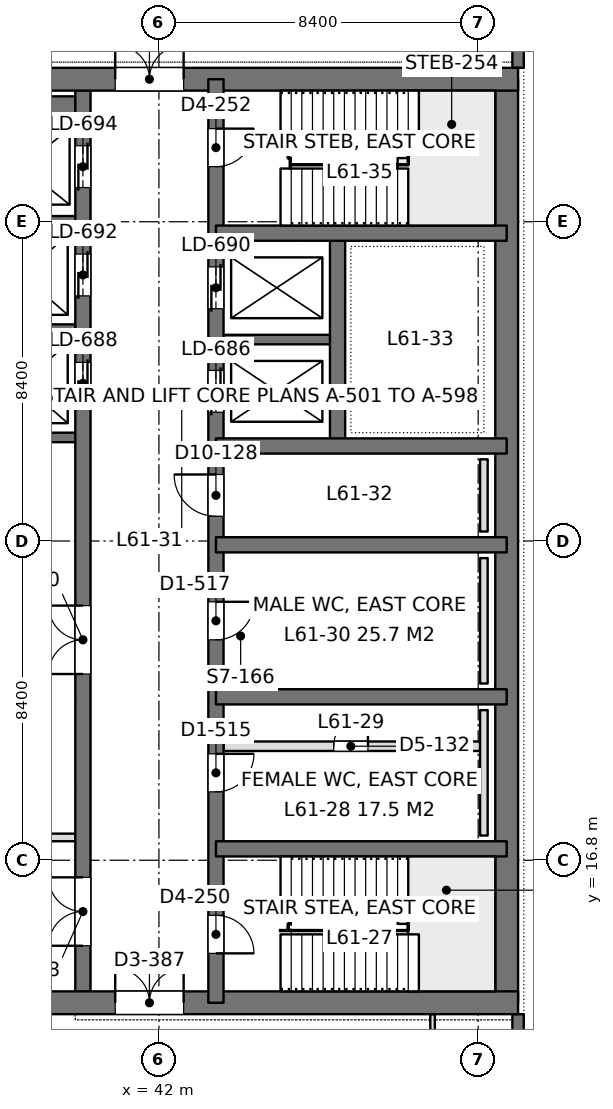
"""IFC4 building model, lengths in metres.
Left out: names, types, materials, properties, quantities, classifications, styles, units other than length and angle.
Written with IfcOpenShell. Run it as: python <this file> out.ifc"""

import sys

from ifc_helpers import new_model, si_unit, direction, frame, frame_2d, origin, place, context, subcontext, project, spatial, rectangle, extrude, element, fill, save


model = new_model("IFC4")
c1 = context("Model", 3, precision=1e-05, world=origin(), true_north=direction((0.0, 1.0)))
c2 = subcontext(c1, "Body", "Model", "MODEL_VIEW")
j1 = project(units=[si_unit("LENGTHUNIT", "METRE"), si_unit("PLANEANGLEUNIT", "RADIAN")], contexts=[c1])
p1 = place(None, origin())
s1 = spatial("IfcSite", under=j1, at=p1, CompositionType="ELEMENT")
p2 = place(p1, origin())
s2 = spatial("IfcBuilding", under=s1, at=p2, CompositionType="ELEMENT")
p3 = place(p2, frame((0.0, 0.0, 268.2)))
s3 = spatial("IfcBuildingStorey", under=s2, at=p3, CompositionType="ELEMENT", Elevation=268.2)
p4 = place(p3, frame((33.75, 13.05, 0.0), z_axis=(0.0, 0.0, 1.0), x_axis=(1.0, 0.0, 0.0)))
e1 = element("IfcWall", 1, at=p4, inside=s3, PredefinedType="SHEAR", context=c2, shape_type="SweptSolid", body=[
    extrude(rectangle(XDim=17.7, YDim=0.6, at=frame_2d((8.85, 0.0))), origin(), (0.0, 0.0, 1.0), 4.5),
])
p5 = place(p4, frame((7.1, 0.0, 0.0)))
e2 = element("IfcOpeningElement", 2, at=p5, cuts=e1, PredefinedType="OPENING", context=c2, shape_type="SweptSolid", body=[
    extrude(rectangle(XDim=1.8, YDim=2.4, at=frame_2d((0.9, 1.2))), frame((0.0, 0.31, 0.0), z_axis=(0.0, -1.0, 0.0), x_axis=(1.0, 0.0, 0.0)), (0.0, 0.0, 1.0), 0.62),
])
p6 = place(p3, frame((33.75, 37.35, 0.0), z_axis=(0.0, 0.0, 1.0), x_axis=(1.0, 0.0, 0.0)))
e3 = element("IfcWall", 3, at=p6, inside=s3, PredefinedType="SHEAR", context=c2, shape_type="SweptSolid", body=[
    extrude(rectangle(XDim=17.7, YDim=0.6, at=frame_2d((8.85, 0.0))), origin(), (0.0, 0.0, 1.0), 4.5),
])
p7 = place(p6, frame((7.1, 0.0, 0.0)))
e4 = element("IfcOpeningElement", 4, at=p7, cuts=e3, PredefinedType="OPENING", context=c2, shape_type="SweptSolid", body=[
    extrude(rectangle(XDim=1.8, YDim=2.4, at=frame_2d((0.9, 1.2))), frame((0.0, 0.31, 0.0), z_axis=(0.0, -1.0, 0.0), x_axis=(1.0, 0.0, 0.0)), (0.0, 0.0, 1.0), 0.62),
])
p8 = place(p3, frame((51.15, 13.05, 0.0), z_axis=(0.0, 0.0, 1.0), x_axis=(0.0, 1.0, 0.0)))
e5 = element("IfcWall", 5, at=p8, inside=s3, PredefinedType="SHEAR", context=c2, shape_type="SweptSolid", body=[
    extrude(rectangle(XDim=24.3, YDim=0.6, at=frame_2d((12.15, 0.0))), origin(), (0.0, 0.0, 1.0), 4.5),
])
p9 = place(p3, frame((43.5, 13.05, 0.0), z_axis=(0.0, 0.0, 1.0), x_axis=(0.0, 1.0, 0.0)))
e6 = element("IfcWall", 6, at=p9, inside=s3, PredefinedType="SHEAR", context=c2, shape_type="SweptSolid", body=[
    extrude(rectangle(XDim=24.3, YDim=0.4, at=frame_2d((12.15, 0.0))), origin(), (0.0, 0.0, 1.0), 4.5),
])
p10 = place(p9, frame((1.3, 0.0, 0.0)))
e7 = element("IfcOpeningElement", 7, at=p10, cuts=e6, PredefinedType="OPENING", context=c2, shape_type="SweptSolid", body=[
    extrude(rectangle(XDim=1.0, YDim=2.2, at=frame_2d((0.5, 1.1))), frame((0.0, 0.21, 0.0), z_axis=(0.0, -1.0, 0.0), x_axis=(1.0, 0.0, 0.0)), (0.0, 0.0, 1.0), 0.42),
])
p11 = place(p9, frame((22.0, 0.0, 0.0)))
e8 = element("IfcOpeningElement", 8, at=p11, cuts=e6, PredefinedType="OPENING", context=c2, shape_type="SweptSolid", body=[
    extrude(rectangle(XDim=1.0, YDim=2.2, at=frame_2d((0.5, 1.1))), frame((0.0, 0.21, 0.0), z_axis=(0.0, -1.0, 0.0), x_axis=(1.0, 0.0, 0.0)), (0.0, 0.0, 1.0), 0.42),
])
p12 = place(p9, frame((5.55, 0.0, 0.0)))
e9 = element("IfcOpeningElement", 9, at=p12, cuts=e6, PredefinedType="OPENING", context=c2, shape_type="SweptSolid", body=[
    extrude(rectangle(XDim=1.0, YDim=2.2, at=frame_2d((0.5, 1.1))), frame((0.0, 0.21, 0.0), z_axis=(0.0, -1.0, 0.0), x_axis=(1.0, 0.0, 0.0)), (0.0, 0.0, 1.0), 0.42),
])
p13 = place(p9, frame((9.55, 0.0, 0.0)))
e10 = element("IfcOpeningElement", 10, at=p13, cuts=e6, PredefinedType="OPENING", context=c2, shape_type="SweptSolid", body=[
    extrude(rectangle(XDim=1.0, YDim=2.2, at=frame_2d((0.5, 1.1))), frame((0.0, 0.21, 0.0), z_axis=(0.0, -1.0, 0.0), x_axis=(1.0, 0.0, 0.0)), (0.0, 0.0, 1.0), 0.42),
])
p14 = place(p9, frame((12.8, 0.0, 0.0)))
e11 = element("IfcOpeningElement", 11, at=p14, cuts=e6, PredefinedType="OPENING", context=c2, shape_type="SweptSolid", body=[
    extrude(rectangle(XDim=1.1, YDim=2.2, at=frame_2d((0.55, 1.1))), frame((0.0, 0.21, 0.0), z_axis=(0.0, -1.0, 0.0), x_axis=(1.0, 0.0, 0.0)), (0.0, 0.0, 1.0), 0.42),
])
p15 = place(p9, frame((15.538, 0.0, 0.0)))
e12 = element("IfcOpeningElement", 12, at=p15, cuts=e6, PredefinedType="OPENING", context=c2, shape_type="SweptSolid", body=[
    extrude(rectangle(XDim=1.1, YDim=2.2, at=frame_2d((0.55, 1.1))), frame((0.0, 0.21, 0.0), z_axis=(0.0, -1.0, 0.0), x_axis=(1.0, 0.0, 0.0)), (0.0, 0.0, 1.0), 0.42),
])
p16 = place(p9, frame((18.262, 0.0, 0.0)))
e13 = element("IfcOpeningElement", 13, at=p16, cuts=e6, PredefinedType="OPENING", context=c2, shape_type="SweptSolid", body=[
    extrude(rectangle(XDim=1.1, YDim=2.2, at=frame_2d((0.55, 1.1))), frame((0.0, 0.21, 0.0), z_axis=(0.0, -1.0, 0.0), x_axis=(1.0, 0.0, 0.0)), (0.0, 0.0, 1.0), 0.42),
])
p17 = place(p3, frame((40.0, 13.05, 0.0), z_axis=(0.0, 0.0, 1.0), x_axis=(0.0, 1.0, 0.0)))
e14 = element("IfcWall", 14, at=p17, inside=s3, PredefinedType="SHEAR", context=c2, shape_type="SweptSolid", body=[
    extrude(rectangle(XDim=24.3, YDim=0.4, at=frame_2d((12.15, 0.0))), origin(), (0.0, 0.0, 1.0), 4.5),
])
p18 = place(p17, frame((15.75, 0.0, 0.0)))
e15 = element("IfcOpeningElement", 15, at=p18, cuts=e14, PredefinedType="OPENING", context=c2, shape_type="SweptSolid", body=[
    extrude(rectangle(XDim=1.1, YDim=2.2, at=frame_2d((0.55, 1.1))), frame((0.0, 0.21, 0.0), z_axis=(0.0, -1.0, 0.0), x_axis=(1.0, 0.0, 0.0)), (0.0, 0.0, 1.0), 0.42),
])
p19 = place(p17, frame((18.6, 0.0, 0.0)))
e16 = element("IfcOpeningElement", 16, at=p19, cuts=e14, PredefinedType="OPENING", context=c2, shape_type="SweptSolid", body=[
    extrude(rectangle(XDim=1.1, YDim=2.2, at=frame_2d((0.55, 1.1))), frame((0.0, 0.21, 0.0), z_axis=(0.0, -1.0, 0.0), x_axis=(1.0, 0.0, 0.0)), (0.0, 0.0, 1.0), 0.42),
])
p20 = place(p17, frame((21.45, 0.0, 0.0)))
e17 = element("IfcOpeningElement", 17, at=p20, cuts=e14, PredefinedType="OPENING", context=c2, shape_type="SweptSolid", body=[
    extrude(rectangle(XDim=1.1, YDim=2.2, at=frame_2d((0.55, 1.1))), frame((0.0, 0.21, 0.0), z_axis=(0.0, -1.0, 0.0), x_axis=(1.0, 0.0, 0.0)), (0.0, 0.0, 1.0), 0.42),
])
p21 = place(p17, frame((8.65, 0.0, 0.0)))
e18 = element("IfcOpeningElement", 18, at=p21, cuts=e14, PredefinedType="OPENING", context=c2, shape_type="SweptSolid", body=[
    extrude(rectangle(XDim=1.8, YDim=2.4, at=frame_2d((0.9, 1.2))), frame((0.0, 0.21, 0.0), z_axis=(0.0, -1.0, 0.0), x_axis=(1.0, 0.0, 0.0)), (0.0, 0.0, 1.0), 0.42),
])
p22 = place(p17, frame((1.5, 0.0, 0.0)))
e19 = element("IfcOpeningElement", 19, at=p22, cuts=e14, PredefinedType="OPENING", context=c2, shape_type="SweptSolid", body=[
    extrude(rectangle(XDim=1.8, YDim=2.4, at=frame_2d((0.9, 1.2))), frame((0.0, 0.21, 0.0), z_axis=(0.0, -1.0, 0.0), x_axis=(1.0, 0.0, 0.0)), (0.0, 0.0, 1.0), 0.42),
])
for number, where, z_axis, x_axis in (
    (20, (51.15, 17.1, 0.0), (0.0, 0.0, 1.0), (-1.0, 0.0, 0.0)),
    (21, (51.15, 21.1, 0.0), (0.0, 0.0, 1.0), (-1.0, 0.0, 0.0)),
    (22, (51.15, 25.1, 0.0), (0.0, 0.0, 1.0), (-1.0, 0.0, 0.0)),
    (23, (51.15, 27.7, 0.0), (0.0, 0.0, 1.0), (-1.0, 0.0, 0.0)),
    (24, (51.15, 33.3, 0.0), (0.0, 0.0, 1.0), (-1.0, 0.0, 0.0)),
):
    element("IfcWall", number, at=place(p3, frame(where, z_axis=z_axis, x_axis=x_axis)), inside=s3, PredefinedType="SHEAR", context=c2, shape_type="SweptSolid", body=[
        extrude(rectangle(XDim=7.65, YDim=0.4, at=frame_2d((3.825, 0.0))), origin(), (0.0, 0.0, 1.0), 4.5),
    ])
p23 = place(p3, frame((46.7, 27.7, 0.0), z_axis=(0.0, 0.0, 1.0), x_axis=(0.0, 1.0, 0.0)))
e25 = element("IfcWall", 25, at=p23, inside=s3, PredefinedType="SHEAR", context=c2, shape_type="SweptSolid", body=[
    extrude(rectangle(XDim=5.6, YDim=0.4, at=frame_2d((2.8, 0.0))), origin(), (0.0, 0.0, 1.0), 4.5),
])
p24 = place(p3, frame((46.7, 30.5, 0.0), z_axis=(0.0, 0.0, 1.0), x_axis=(-1.0, 0.0, 0.0)))
e26 = element("IfcWall", 26, at=p24, inside=s3, PredefinedType="SHEAR", context=c2, shape_type="SweptSolid", body=[
    extrude(rectangle(XDim=3.2, YDim=0.25, at=frame_2d((1.6, 0.0))), origin(), (0.0, 0.0, 1.0), 4.5),
])
p25 = place(p3, frame((40.0, 27.925, 0.0), z_axis=(0.0, 0.0, 1.0), x_axis=(-1.0, 0.0, 0.0)))
e27 = element("IfcWall", 27, at=p25, inside=s3, PredefinedType="SHEAR", context=c2, shape_type="SweptSolid", body=[
    extrude(rectangle(XDim=5.95, YDim=0.25, at=frame_2d((2.975, 0.0))), origin(), (0.0, 0.0, 1.0), 4.5),
])
for number, where, z_axis, x_axis in (
    (28, (40.0, 30.775, 0.0), (0.0, 0.0, 1.0), (-1.0, 0.0, 0.0)),
    (29, (40.0, 33.625, 0.0), (0.0, 0.0, 1.0), (-1.0, 0.0, 0.0)),
):
    element("IfcWall", number, at=place(p3, frame(where, z_axis=z_axis, x_axis=x_axis)), inside=s3, PredefinedType="SHEAR", context=c2, shape_type="SweptSolid", body=[
        extrude(rectangle(XDim=3.2, YDim=0.25, at=frame_2d((1.6, 0.0))), origin(), (0.0, 0.0, 1.0), 4.5),
    ])
p26 = place(p3, frame((40.0, 36.625, 0.0), z_axis=(0.0, 0.0, 1.0), x_axis=(-1.0, 0.0, 0.0)))
e30 = element("IfcWall", 30, at=p26, inside=s3, PredefinedType="SHEAR", context=c2, shape_type="SweptSolid", body=[
    extrude(rectangle(XDim=3.2, YDim=0.55, at=frame_2d((1.6, 0.0))), origin(), (0.0, 0.0, 1.0), 4.5),
])
p27 = place(p3, frame((51.45, 42.0, 0.0), z_axis=(0.0, 0.0, 1.0), x_axis=(0.0, -1.0, 0.0)))
e31 = element("IfcWall", 31, at=p27, inside=s3, PredefinedType="SOLIDWALL", context=c2, shape_type="SweptSolid", body=[
    extrude(rectangle(XDim=4.35, YDim=0.3, at=frame_2d((2.175, 0.0))), origin(), (0.0, 0.0, 1.0), 4.35),
])
p28 = place(p27, frame((0.975, 0.0, 0.9)))
e32 = element("IfcOpeningElement", 32, at=p28, cuts=e31, PredefinedType="OPENING", context=c2, shape_type="SweptSolid", body=[
    extrude(rectangle(XDim=2.4, YDim=1.9, at=frame_2d((1.2, 0.95))), frame((0.0, 0.16, 0.0), z_axis=(0.0, -1.0, 0.0), x_axis=(1.0, 0.0, 0.0)), (0.0, 0.0, 1.0), 0.32),
])
p29 = place(p3, frame((51.45, 12.75, 0.0), z_axis=(0.0, 0.0, 1.0), x_axis=(0.0, -1.0, 0.0)))
e33 = element("IfcWall", 33, at=p29, inside=s3, PredefinedType="SOLIDWALL", context=c2, shape_type="SweptSolid", body=[
    extrude(rectangle(XDim=4.35, YDim=0.3, at=frame_2d((2.175, 0.0))), origin(), (0.0, 0.0, 1.0), 4.35),
])
p30 = place(p29, frame((0.975, 0.0, 0.9)))
e34 = element("IfcOpeningElement", 34, at=p30, cuts=e33, PredefinedType="OPENING", context=c2, shape_type="SweptSolid", body=[
    extrude(rectangle(XDim=2.4, YDim=1.9, at=frame_2d((1.2, 0.95))), frame((0.0, 0.16, 0.0), z_axis=(0.0, -1.0, 0.0), x_axis=(1.0, 0.0, 0.0)), (0.0, 0.0, 1.0), 0.32),
])
p31 = place(p3, frame((33.898, 17.4, 0.0), z_axis=(0.0, 0.0, 1.0), x_axis=(1.0, 0.0, 0.0)))
e35 = element("IfcWall", 35, at=p31, inside=s3, PredefinedType="PARTITIONING", context=c2, shape_type="SweptSolid", body=[
    extrude(rectangle(XDim=5.904, YDim=0.2, at=frame_2d((2.952, 0.0))), origin(), (0.0, 0.0, 1.0), 3.8),
])
p32 = place(p3, frame((49.2, 10.8, 0.0), z_axis=(0.0, 0.0, 1.0), x_axis=(0.0, 1.0, 0.0)))
e36 = element("IfcWall", 36, at=p32, inside=s3, PredefinedType="PARTITIONING", context=c2, shape_type="SweptSolid", body=[
    extrude(rectangle(XDim=1.952, YDim=0.12, at=frame_2d((0.976, 0.0))), origin(), (0.0, 0.0, 1.0), 4.35),
])
p33 = place(p3, frame((49.2, 37.648, 0.0), z_axis=(0.0, 0.0, 1.0), x_axis=(0.0, 1.0, 0.0)))
e37 = element("IfcWall", 37, at=p33, inside=s3, PredefinedType="PARTITIONING", context=c2, shape_type="SweptSolid", body=[
    extrude(rectangle(XDim=1.952, YDim=0.12, at=frame_2d((0.976, 0.0))), origin(), (0.0, 0.0, 1.0), 4.35),
])
p34 = place(p3, frame((43.7, 19.8, 0.0), z_axis=(0.0, 0.0, 1.0), x_axis=(1.0, 0.0, 0.0)))
e38 = element("IfcWall", 38, at=p34, inside=s3, PredefinedType="PARTITIONING", context=c2, shape_type="SweptSolid", body=[
    extrude(rectangle(XDim=6.75, YDim=0.25, at=frame_2d((3.375, 0.0))), origin(), (0.0, 0.0, 1.0), 4.3),
])
p35 = place(p34, frame((2.9, 0.0, 0.0)))
e39 = element("IfcOpeningElement", 39, at=p35, cuts=e38, PredefinedType="OPENING", context=c2, shape_type="SweptSolid", body=[
    extrude(rectangle(XDim=0.9, YDim=2.2, at=frame_2d((0.45, 1.1))), frame((0.0, 0.135, 0.0), z_axis=(0.0, -1.0, 0.0), x_axis=(1.0, 0.0, 0.0)), (0.0, 0.0, 1.0), 0.27),
])
for number, where, z_axis, x_axis in (
    (40, (50.55, 17.45, 0.0), (0.0, 0.0, 1.0), (0.0, 1.0, 0.0)),
    (41, (50.55, 21.45, 0.0), (0.0, 0.0, 1.0), (0.0, 1.0, 0.0)),
):
    element("IfcWall", number, at=place(p3, frame(where, z_axis=z_axis, x_axis=x_axis)), inside=s3, PredefinedType="PLUMBINGWALL", context=c2, shape_type="SweptSolid", body=[
        extrude(rectangle(XDim=3.3, YDim=0.2, at=frame_2d((1.65, 0.0))), origin(), (0.0, 0.0, 1.0), 1.2),
    ])
p36 = place(p3, frame((50.55, 25.45, 0.0), z_axis=(0.0, 0.0, 1.0), x_axis=(0.0, 1.0, 0.0)))
e42 = element("IfcWall", 42, at=p36, inside=s3, PredefinedType="PLUMBINGWALL", context=c2, shape_type="SweptSolid", body=[
    extrude(rectangle(XDim=1.9, YDim=0.2, at=frame_2d((0.95, 0.0))), origin(), (0.0, 0.0, 1.0), 1.2),
])
p37 = place(p5, origin())
e43 = element("IfcDoor", 43, at=p37, inside=s3, OperationType="DOUBLE_DOOR_SINGLE_SWING", PredefinedType="DOOR", context=c2, shape_type="SweptSolid", body=[
    extrude(rectangle(XDim=1.8, YDim=2.4, at=frame_2d((0.9, 1.2))), frame((0.0, 0.025, 0.0), z_axis=(0.0, -1.0, 0.0), x_axis=(1.0, 0.0, 0.0)), (0.0, 0.0, 1.0), 0.05),
])
fill(e2, e43)
p38 = place(p7, origin())
e44 = element("IfcDoor", 44, at=p38, inside=s3, OperationType="DOUBLE_DOOR_SINGLE_SWING", PredefinedType="DOOR", context=c2, shape_type="SweptSolid", body=[
    extrude(rectangle(XDim=1.8, YDim=2.4, at=frame_2d((0.9, 1.2))), frame((0.0, 0.025, 0.0), z_axis=(0.0, -1.0, 0.0), x_axis=(1.0, 0.0, 0.0)), (0.0, 0.0, 1.0), 0.05),
])
fill(e4, e44)
p39 = place(p10, frame((1.0, 0.0, 0.0), z_axis=(0.0, 0.0, 1.0), x_axis=(-1.0, 0.0, 0.0)))
e45 = element("IfcDoor", 45, at=p39, inside=s3, OperationType="SINGLE_SWING_RIGHT", PredefinedType="DOOR", context=c2, shape_type="SweptSolid", body=[
    extrude(rectangle(XDim=1.0, YDim=2.2, at=frame_2d((0.5, 1.1))), frame((0.0, 0.025, 0.0), z_axis=(0.0, -1.0, 0.0), x_axis=(1.0, 0.0, 0.0)), (0.0, 0.0, 1.0), 0.05),
])
fill(e7, e45)
p40 = place(p11, frame((1.0, 0.0, 0.0), z_axis=(0.0, 0.0, 1.0), x_axis=(-1.0, 0.0, 0.0)))
e46 = element("IfcDoor", 46, at=p40, inside=s3, OperationType="SINGLE_SWING_LEFT", PredefinedType="DOOR", context=c2, shape_type="SweptSolid", body=[
    extrude(rectangle(XDim=1.0, YDim=2.2, at=frame_2d((0.5, 1.1))), frame((0.0, 0.025, 0.0), z_axis=(0.0, -1.0, 0.0), x_axis=(1.0, 0.0, 0.0)), (0.0, 0.0, 1.0), 0.05),
])
fill(e8, e46)
p41 = place(p12, frame((1.0, 0.0, 0.0), z_axis=(0.0, 0.0, 1.0), x_axis=(-1.0, 0.0, 0.0)))
e47 = element("IfcDoor", 47, at=p41, inside=s3, OperationType="SINGLE_SWING_LEFT", PredefinedType="DOOR", context=c2, shape_type="SweptSolid", body=[
    extrude(rectangle(XDim=1.0, YDim=2.2, at=frame_2d((0.5, 1.1))), frame((0.0, 0.025, 0.0), z_axis=(0.0, -1.0, 0.0), x_axis=(1.0, 0.0, 0.0)), (0.0, 0.0, 1.0), 0.05),
])
fill(e9, e47)
p42 = place(p13, frame((1.0, 0.0, 0.0), z_axis=(0.0, 0.0, 1.0), x_axis=(-1.0, 0.0, 0.0)))
e48 = element("IfcDoor", 48, at=p42, inside=s3, OperationType="SINGLE_SWING_LEFT", PredefinedType="DOOR", context=c2, shape_type="SweptSolid", body=[
    extrude(rectangle(XDim=1.0, YDim=2.2, at=frame_2d((0.5, 1.1))), frame((0.0, 0.025, 0.0), z_axis=(0.0, -1.0, 0.0), x_axis=(1.0, 0.0, 0.0)), (0.0, 0.0, 1.0), 0.05),
])
fill(e10, e48)
p43 = place(p14, origin())
e49 = element("IfcDoor", 49, at=p43, inside=s3, OperationType="SINGLE_SWING_RIGHT", PredefinedType="DOOR", context=c2, shape_type="SweptSolid", body=[
    extrude(rectangle(XDim=1.1, YDim=2.2, at=frame_2d((0.55, 1.1))), frame((0.0, 0.025, 0.0), z_axis=(0.0, -1.0, 0.0), x_axis=(1.0, 0.0, 0.0)), (0.0, 0.0, 1.0), 0.05),
])
fill(e11, e49)
p44 = place(p18, origin())
e50 = element("IfcDoor", 50, at=p44, inside=s3, OperationType="DOUBLE_DOOR_SLIDING", PredefinedType="DOOR", context=c2, shape_type="SweptSolid", body=[
    extrude(rectangle(XDim=1.1, YDim=2.2, at=frame_2d((0.55, 1.1))), frame((0.0, 0.025, 0.0), z_axis=(0.0, -1.0, 0.0), x_axis=(1.0, 0.0, 0.0)), (0.0, 0.0, 1.0), 0.05),
])
fill(e15, e50)
p45 = place(p19, origin())
e51 = element("IfcDoor", 51, at=p45, inside=s3, OperationType="DOUBLE_DOOR_SLIDING", PredefinedType="DOOR", context=c2, shape_type="SweptSolid", body=[
    extrude(rectangle(XDim=1.1, YDim=2.2, at=frame_2d((0.55, 1.1))), frame((0.0, 0.025, 0.0), z_axis=(0.0, -1.0, 0.0), x_axis=(1.0, 0.0, 0.0)), (0.0, 0.0, 1.0), 0.05),
])
fill(e16, e51)
p46 = place(p20, origin())
e52 = element("IfcDoor", 52, at=p46, inside=s3, OperationType="DOUBLE_DOOR_SLIDING", PredefinedType="DOOR", context=c2, shape_type="SweptSolid", body=[
    extrude(rectangle(XDim=1.1, YDim=2.2, at=frame_2d((0.55, 1.1))), frame((0.0, 0.025, 0.0), z_axis=(0.0, -1.0, 0.0), x_axis=(1.0, 0.0, 0.0)), (0.0, 0.0, 1.0), 0.05),
])
fill(e17, e52)
p47 = place(p15, origin())
e53 = element("IfcDoor", 53, at=p47, inside=s3, OperationType="DOUBLE_DOOR_SLIDING", PredefinedType="DOOR", context=c2, shape_type="SweptSolid", body=[
    extrude(rectangle(XDim=1.1, YDim=2.2, at=frame_2d((0.55, 1.1))), frame((0.0, 0.025, 0.0), z_axis=(0.0, -1.0, 0.0), x_axis=(1.0, 0.0, 0.0)), (0.0, 0.0, 1.0), 0.05),
])
fill(e12, e53)
p48 = place(p16, origin())
e54 = element("IfcDoor", 54, at=p48, inside=s3, OperationType="DOUBLE_DOOR_SLIDING", PredefinedType="DOOR", context=c2, shape_type="SweptSolid", body=[
    extrude(rectangle(XDim=1.1, YDim=2.2, at=frame_2d((0.55, 1.1))), frame((0.0, 0.025, 0.0), z_axis=(0.0, -1.0, 0.0), x_axis=(1.0, 0.0, 0.0)), (0.0, 0.0, 1.0), 0.05),
])
fill(e13, e54)
p49 = place(p21, origin())
e55 = element("IfcDoor", 55, at=p49, inside=s3, OperationType="DOUBLE_DOOR_SINGLE_SWING", PredefinedType="DOOR", context=c2, shape_type="SweptSolid", body=[
    extrude(rectangle(XDim=1.8, YDim=2.4, at=frame_2d((0.9, 1.2))), frame((0.0, 0.025, 0.0), z_axis=(0.0, -1.0, 0.0), x_axis=(1.0, 0.0, 0.0)), (0.0, 0.0, 1.0), 0.05),
])
fill(e18, e55)
p50 = place(p22, origin())
e56 = element("IfcDoor", 56, at=p50, inside=s3, OperationType="DOUBLE_DOOR_SINGLE_SWING", PredefinedType="DOOR", context=c2, shape_type="SweptSolid", body=[
    extrude(rectangle(XDim=1.8, YDim=2.4, at=frame_2d((0.9, 1.2))), frame((0.0, 0.025, 0.0), z_axis=(0.0, -1.0, 0.0), x_axis=(1.0, 0.0, 0.0)), (0.0, 0.0, 1.0), 0.05),
])
fill(e19, e56)
p51 = place(p35, origin())
e57 = element("IfcDoor", 57, at=p51, inside=s3, OperationType="SINGLE_SWING_RIGHT", PredefinedType="DOOR", context=c2, shape_type="SweptSolid", body=[
    extrude(rectangle(XDim=0.9, YDim=2.2, at=frame_2d((0.45, 1.1))), frame((0.0, 0.025, 0.0), z_axis=(0.0, -1.0, 0.0), x_axis=(1.0, 0.0, 0.0)), (0.0, 0.0, 1.0), 0.05),
])
fill(e39, e57)
save(model, sys.argv[1])
